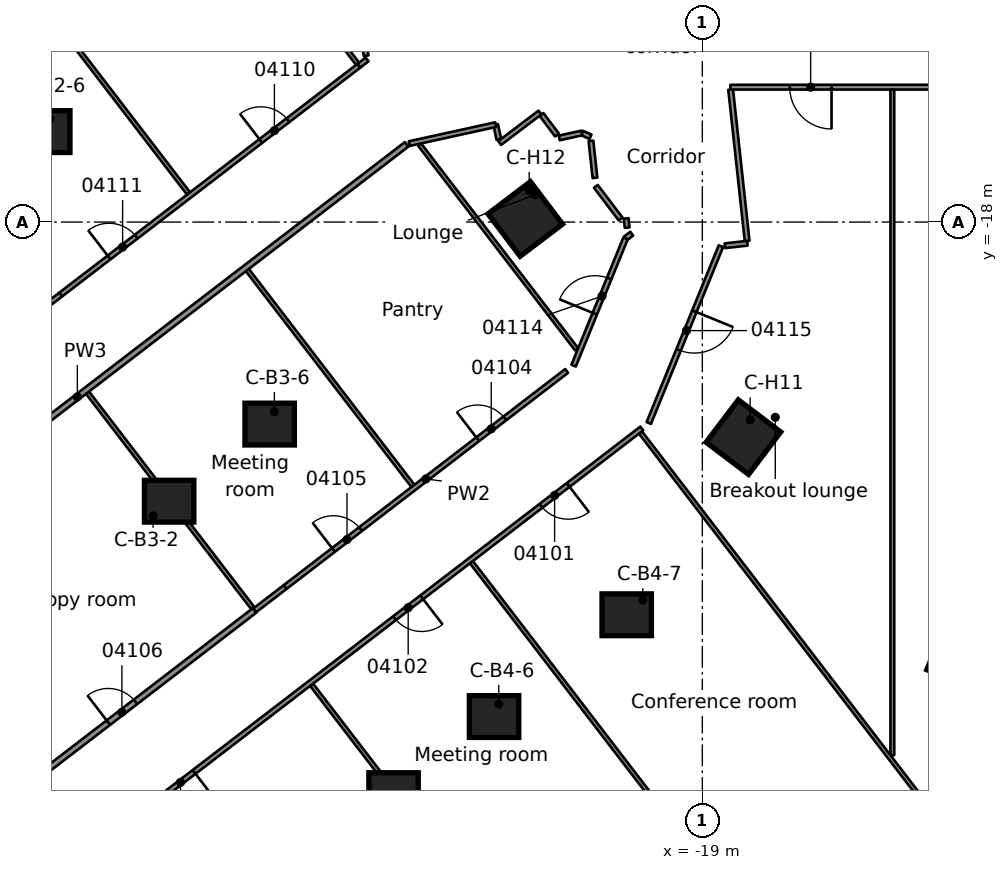
"""IFC4 building model, lengths in metres.
Left out: names, types, materials, properties, quantities, classifications, styles, units other than length and angle.
Written with IfcOpenShell. Run it as: python <this file> out.ifc"""

import sys

from ifc_helpers import new_model, si_unit, direction, frame, frame_2d, origin, origin_2d, place, context, subcontext, project, spatial, rectangle, extrude, element, fill, save


model = new_model("IFC4")
c1 = context("Model", 3, precision=1e-05, world=origin(), true_north=direction((0.0, 1.0)))
c2 = subcontext(c1, "Body", "Model", "MODEL_VIEW")
j1 = project(units=[si_unit("LENGTHUNIT", "METRE"), si_unit("PLANEANGLEUNIT", "RADIAN")], contexts=[c1])
p1 = place(None, origin())
s1 = spatial("IfcSite", under=j1, at=p1, CompositionType="ELEMENT")
p2 = place(p1, origin())
s2 = spatial("IfcBuilding", under=s1, at=p2, CompositionType="ELEMENT")
p3 = place(p2, frame((0.0, 0.0, 20.5)))
s3 = spatial("IfcBuildingStorey", under=s2, at=p3, CompositionType="ELEMENT", Elevation=20.5)
for number, where, z_axis, x_axis in (
    (1, (-36.29, -15.62, 0.0), (0.0, 0.0, 1.0), (1.0, 0.0, 0.0)),
    (2, (-33.03, -25.345, 0.0), (0.0, 0.0, 1.0), (1.0, 0.0, 0.0)),
    (3, (-30.385, -23.316, 0.0), (0.0, 0.0, 1.0), (1.0, 0.0, 0.0)),
    (4, (-27.125, -33.04, 0.0), (0.0, 0.0, 1.0), (1.0, 0.0, 0.0)),
    (5, (-24.48, -31.011, 0.0), (0.0, 0.0, 1.0), (1.0, 0.0, 0.0)),
    (6, (-20.99, -28.333, 0.0), (0.0, 0.0, 1.0), (1.0, 0.0, 0.0)),
):
    element("IfcColumn", number, at=place(p3, frame(where, z_axis=z_axis, x_axis=x_axis)), inside=s3, PredefinedType="COLUMN", context=c2, shape_type="SweptSolid", body=[
        extrude(rectangle(XDim=1.3, YDim=1.1, at=origin_2d()), origin(), (0.0, 0.0, 1.0), 4.6),
    ])
for number, where, z_axis, x_axis in (
    (7, (-12.178, -29.4, 0.0), (0.0, 0.0, 1.0), (-0.383, -0.924, 0.0)),
    (8, (-17.919, -23.659, 0.0), (0.0, 0.0, 1.0), (-0.604, -0.797, 0.0)),
    (9, (-23.659, -17.919, 0.0), (0.0, 0.0, 1.0), (-0.797, -0.604, 0.0)),
):
    element("IfcColumn", number, at=place(p3, frame(where, z_axis=z_axis, x_axis=x_axis)), inside=s3, PredefinedType="COLUMN", context=c2, shape_type="SweptSolid", body=[
        extrude(rectangle(XDim=1.4, YDim=1.4, at=origin_2d()), origin(), (0.0, 0.0, 1.0), 4.6),
    ])
p4 = place(p3, frame((-21.004, -17.904, 0.0), z_axis=(0.0, 0.0, 1.0), x_axis=(0.105933230141, -0.994373245191, 0.0)))
e10 = element("IfcWall", 10, at=p4, inside=s3, PredefinedType="PARTITIONING", context=c2, shape_type="SweptSolid", body=[
    extrude(rectangle(XDim=0.244, YDim=0.125, at=frame_2d((0.122, 0.0))), origin(), (0.0, 0.0, 1.0), 4.16),
])
p5 = place(p3, frame((-21.931, -15.864, 0.0), z_axis=(0.0, 0.0, 1.0), x_axis=(0.10837572028, -0.99411000561, 0.0)))
e11 = element("IfcWall", 11, at=p5, inside=s3, PredefinedType="PARTITIONING", context=c2, shape_type="SweptSolid", body=[
    extrude(rectangle(XDim=0.978, YDim=0.125, at=frame_2d((0.489, 0.0))), origin(), (0.0, 0.0, 1.0), 4.16),
])
p6 = place(p3, frame((-18.255, -14.513, 0.0), z_axis=(0.0, 0.0, 1.0), x_axis=(0.108304050005, -0.994117816334, 0.0)))
e12 = element("IfcWall", 12, at=p6, inside=s3, PredefinedType="PARTITIONING", context=c2, shape_type="SweptSolid", body=[
    extrude(rectangle(XDim=4.006, YDim=0.125, at=frame_2d((2.003, 0.0))), origin(), (0.0, 0.0, 1.0), 4.16),
])
p7 = place(p3, frame((-24.438, -15.437, 0.0), z_axis=(0.0, 0.0, 1.0), x_axis=(0.212096867325, -0.977248647413, 0.0)))
e13 = element("IfcWall", 13, at=p7, inside=s3, PredefinedType="PARTITIONING", context=c2, shape_type="SweptSolid", body=[
    extrude(rectangle(XDim=0.396, YDim=0.125, at=frame_2d((0.198, 0.0))), origin(), (0.0, 0.0, 1.0), 4.16),
])
p8 = place(p3, frame((-27.959, -13.1, 0.0), z_axis=(0.0, 0.0, 1.0), x_axis=(0.215346078447, -0.976537795734, 0.0)))
e14 = element("IfcWall", 14, at=p8, inside=s3, PredefinedType="PARTITIONING", context=c2, shape_type="SweptSolid", body=[
    extrude(rectangle(XDim=0.539, YDim=0.125, at=frame_2d((0.269, 0.0))), origin(), (0.0, 0.0, 1.0), 4.16),
])
p9 = place(p3, frame((-23.234, -15.168, 0.0), z_axis=(0.0, 0.0, 1.0), x_axis=(0.602990949897, -0.797748026849, 0.0)))
e15 = element("IfcWall", 15, at=p9, inside=s3, PredefinedType="PARTITIONING", context=c2, shape_type="SweptSolid", body=[
    extrude(rectangle(XDim=0.678, YDim=0.125, at=frame_2d((0.339, 0.0))), origin(), (0.0, 0.0, 1.0), 4.16),
])
p10 = place(p3, frame((-21.801, -17.061, 0.0), z_axis=(0.0, 0.0, 1.0), x_axis=(0.604123687543, -0.796890563471, 0.0)))
e16 = element("IfcWall", 16, at=p10, inside=s3, PredefinedType="PARTITIONING", context=c2, shape_type="SweptSolid", body=[
    extrude(rectangle(XDim=1.078, YDim=0.125, at=frame_2d((0.539, 0.0))), origin(), (0.0, 0.0, 1.0), 4.16),
])
p11 = place(p3, frame((-35.179, -22.489, 0.0), z_axis=(0.0, 0.0, 1.0), x_axis=(0.608729798771, -0.793377610024, 0.0)))
e17 = element("IfcWall", 17, at=p11, inside=s3, PredefinedType="PARTITIONING", context=c2, shape_type="SweptSolid", body=[
    extrude(rectangle(XDim=7.148, YDim=0.1, at=frame_2d((3.574, 0.0))), origin(), (0.0, 0.0, 1.0), 4.16),
])
p12 = place(p3, frame((-29.282, -30.175, 0.0), z_axis=(0.0, 0.0, 1.0), x_axis=(0.608783902678, -0.793336095132, 0.0)))
e18 = element("IfcWall", 18, at=p12, inside=s3, PredefinedType="PARTITIONING", context=c2, shape_type="SweptSolid", body=[
    extrude(rectangle(XDim=14.136, YDim=0.1, at=frame_2d((7.068, 0.0))), origin(), (0.0, 0.0, 1.0), 4.16),
])
p13 = place(p3, frame((-41.126, -6.033, 0.0), z_axis=(0.0, 0.0, 1.0), x_axis=(0.608775561638, -0.793342495743, 0.0)))
e19 = element("IfcWall", 19, at=p13, inside=s3, PredefinedType="PARTITIONING", context=c2, shape_type="SweptSolid", body=[
    extrude(rectangle(XDim=14.136, YDim=0.1, at=frame_2d((7.068, 0.0))), origin(), (0.0, 0.0, 1.0), 4.16),
])
p14 = place(p3, frame((-30.975, -19.261, 0.0), z_axis=(0.0, 0.0, 1.0), x_axis=(0.60876639971, -0.793349526113, 0.0)))
e20 = element("IfcWall", 20, at=p14, inside=s3, PredefinedType="PARTITIONING", context=c2, shape_type="SweptSolid", body=[
    extrude(rectangle(XDim=7.162, YDim=0.1, at=frame_2d((3.581, 0.0))), origin(), (0.0, 0.0, 1.0), 4.16),
])
p15 = place(p3, frame((-25.077, -26.948, 0.0), z_axis=(0.0, 0.0, 1.0), x_axis=(0.60874219909, -0.793368095557, 0.0)))
e21 = element("IfcWall", 21, at=p15, inside=s3, PredefinedType="PARTITIONING", context=c2, shape_type="SweptSolid", body=[
    extrude(rectangle(XDim=14.137, YDim=0.1, at=frame_2d((7.069, 0.0))), origin(), (0.0, 0.0, 1.0), 4.16),
])
p16 = place(p3, frame((-36.678, -2.62, 0.0), z_axis=(0.0, 0.0, 1.0), x_axis=(0.608783902678, -0.793336095132, 0.0)))
e22 = element("IfcWall", 22, at=p16, inside=s3, PredefinedType="PARTITIONING", context=c2, shape_type="SweptSolid", body=[
    extrude(rectangle(XDim=14.136, YDim=0.1, at=frame_2d((7.068, 0.0))), origin(), (0.0, 0.0, 1.0), 4.16),
])
p17 = place(p3, frame((-26.44, -15.962, 0.0), z_axis=(0.0, 0.0, 1.0), x_axis=(0.608697215762, -0.79340260872, 0.0)))
e23 = element("IfcWall", 23, at=p17, inside=s3, PredefinedType="PARTITIONING", context=c2, shape_type="SweptSolid", body=[
    extrude(rectangle(XDim=6.79, YDim=0.1, at=frame_2d((3.395, 0.0))), origin(), (0.0, 0.0, 1.0), 4.16),
])
p18 = place(p3, frame((-20.63, -23.535, 0.0), z_axis=(0.0, 0.0, 1.0), x_axis=(0.60874219909, -0.793368095557, 0.0)))
e24 = element("IfcWall", 24, at=p18, inside=s3, PredefinedType="PARTITIONING", context=c2, shape_type="SweptSolid", body=[
    extrude(rectangle(XDim=14.137, YDim=0.1, at=frame_2d((7.069, 0.0))), origin(), (0.0, 0.0, 1.0), 4.16),
])
p19 = place(p3, frame((-22.17, -15.656, 0.0), z_axis=(0.0, 0.0, 1.0), x_axis=(0.914864311429, -0.403761429156, 0.0)))
e25 = element("IfcWall", 25, at=p19, inside=s3, PredefinedType="PARTITIONING", context=c2, shape_type="SweptSolid", body=[
    extrude(rectangle(XDim=0.248, YDim=0.125, at=frame_2d((0.124, 0.0))), origin(), (0.0, 0.0, 1.0), 4.16),
])
p20 = place(p3, frame((-10.391, -14.451, 0.0), z_axis=(0.0, 0.0, 1.0), x_axis=(-1.0, 0.0, 0.0)))
e26 = element("IfcWall", 26, at=p20, inside=s3, PredefinedType="PARTITIONING", context=c2, shape_type="SweptSolid", body=[
    extrude(rectangle(XDim=7.871, YDim=0.125, at=frame_2d((3.936, 0.0))), origin(), (0.0, 0.0, 1.0), 4.16),
])
p21 = place(p20, frame((5.209, 0.0, 0.0)))
e27 = element("IfcOpeningElement", 27, at=p21, cuts=e26, PredefinedType="OPENING", context=c2, shape_type="SweptSolid", body=[
    extrude(rectangle(XDim=1.1, YDim=2.1, at=frame_2d((0.55, 1.05))), frame((0.0, 0.073, 0.0), z_axis=(0.0, -1.0, 0.0), x_axis=(1.0, 0.0, 0.0)), (0.0, 0.0, 1.0), 0.145),
])
p22 = place(p20, frame((1.35, 0.0, 0.0)))
e28 = element("IfcOpeningElement", 28, at=p22, cuts=e26, PredefinedType="OPENING", context=c2, shape_type="SweptSolid", body=[
    extrude(rectangle(XDim=0.9, YDim=2.1, at=frame_2d((0.45, 1.05))), frame((0.0, 0.073, 0.0), z_axis=(0.0, -1.0, 0.0), x_axis=(1.0, 0.0, 0.0)), (0.0, 0.0, 1.0), 0.145),
])
p23 = place(p3, frame((-18.406, -18.623, 0.0), z_axis=(0.0, 0.0, 1.0), x_axis=(0.994037722998, 0.109036715182, 0.0)))
e29 = element("IfcWall", 29, at=p23, inside=s3, PredefinedType="PARTITIONING", context=c2, shape_type="SweptSolid", body=[
    extrude(rectangle(XDim=0.596, YDim=0.125, at=frame_2d((0.298, 0.0))), origin(), (0.0, 0.0, 1.0), 4.16),
])
p24 = place(p3, frame((-26.712, -15.936, 0.0), z_axis=(0.0, 0.0, 1.0), x_axis=(0.976756126143, 0.214353609817, 0.0)))
e30 = element("IfcWall", 30, at=p24, inside=s3, PredefinedType="PARTITIONING", context=c2, shape_type="SweptSolid", body=[
    extrude(rectangle(XDim=2.328, YDim=0.125, at=frame_2d((1.164, 0.0))), origin(), (0.0, 0.0, 1.0), 4.16),
])
p25 = place(p3, frame((-22.765, -15.787, 0.0), z_axis=(0.0, 0.0, 1.0), x_axis=(0.97657209397, 0.215190486033, 0.0)))
e31 = element("IfcWall", 31, at=p25, inside=s3, PredefinedType="PARTITIONING", context=c2, shape_type="SweptSolid", body=[
    extrude(rectangle(XDim=0.609, YDim=0.125, at=frame_2d((0.305, 0.0))), origin(), (0.0, 0.0, 1.0), 4.16),
])
p26 = place(p3, frame((-24.332, -15.92, 0.0), z_axis=(0.0, 0.0, 1.0), x_axis=(0.797480426333, 0.603344818172, 0.0)))
e32 = element("IfcWall", 32, at=p26, inside=s3, PredefinedType="PARTITIONING", context=c2, shape_type="SweptSolid", body=[
    extrude(rectangle(XDim=1.329, YDim=0.125, at=frame_2d((0.665, 0.0))), origin(), (0.0, 0.0, 1.0), 4.16),
])
p27 = place(p3, frame((-21.019, -18.428, 0.0), z_axis=(0.0, 0.0, 1.0), x_axis=(0.797092148154, 0.603857687995, 0.0)))
e33 = element("IfcWall", 33, at=p27, inside=s3, PredefinedType="PARTITIONING", context=c2, shape_type="SweptSolid", body=[
    extrude(rectangle(XDim=0.202, YDim=0.125, at=frame_2d((0.101, 0.0))), origin(), (0.0, 0.0, 1.0), 4.16),
])
p28 = place(p3, frame((-20.592, -23.431, 0.0), z_axis=(0.0, 0.0, 1.0), x_axis=(-0.793434310261, -0.608655892356, 0.0)))
e34 = element("IfcWall", 34, at=p28, inside=s3, PredefinedType="PARTITIONING", context=c2, shape_type="SweptSolid", body=[
    extrude(rectangle(XDim=24.899, YDim=0.125, at=frame_2d((12.45, 0.0))), origin(), (0.0, 0.0, 1.0), 4.16),
])
p29 = place(p28, frame((2.443, 0.0, 0.0)))
e35 = element("IfcOpeningElement", 35, at=p29, cuts=e34, PredefinedType="OPENING", context=c2, shape_type="SweptSolid", body=[
    extrude(rectangle(XDim=0.9, YDim=2.1, at=frame_2d((0.45, 1.05))), frame((0.0, 0.073, 0.0), z_axis=(0.0, -1.0, 0.0), x_axis=(1.0, 0.0, 0.0)), (0.0, 0.0, 1.0), 0.145),
])
p30 = place(p28, frame((7.299, 0.0, 0.0)))
e36 = element("IfcOpeningElement", 36, at=p30, cuts=e34, PredefinedType="OPENING", context=c2, shape_type="SweptSolid", body=[
    extrude(rectangle(XDim=0.9, YDim=2.1, at=frame_2d((0.45, 1.05))), frame((0.0, 0.073, 0.0), z_axis=(0.0, -1.0, 0.0), x_axis=(1.0, 0.0, 0.0)), (0.0, 0.0, 1.0), 0.145),
])
p31 = place(p28, frame((14.849, 0.0, 0.0)))
e37 = element("IfcOpeningElement", 37, at=p31, cuts=e34, PredefinedType="OPENING", context=c2, shape_type="SweptSolid", body=[
    extrude(rectangle(XDim=0.9, YDim=2.1, at=frame_2d((0.45, 1.05))), frame((0.0, 0.073, 0.0), z_axis=(0.0, -1.0, 0.0), x_axis=(1.0, 0.0, 0.0)), (0.0, 0.0, 1.0), 0.145),
])
p32 = place(p3, frame((-30.782, -28.22, 0.0), z_axis=(0.0, 0.0, 1.0), x_axis=(0.793579274907, 0.608466872096, 0.0)))
e38 = element("IfcWall", 38, at=p32, inside=s3, PredefinedType="PARTITIONING", context=c2, shape_type="SweptSolid", body=[
    extrude(rectangle(XDim=1.016, YDim=0.125, at=frame_2d((0.508, 0.0))), origin(), (0.0, 0.0, 1.0), 4.16),
])
p33 = place(p3, frame((-39.667, -35.038, 0.0), z_axis=(0.0, 0.0, 1.0), x_axis=(0.793293656215, 0.608839202917, 0.0)))
e39 = element("IfcWall", 39, at=p33, inside=s3, PredefinedType="PARTITIONING", context=c2, shape_type="SweptSolid", body=[
    extrude(rectangle(XDim=11.2, YDim=0.15, at=frame_2d((5.6, 0.0))), origin(), (0.0, 0.0, 1.0), 4.16),
])
p34 = place(p33, frame((6.35, 0.0, 0.0)))
e40 = element("IfcOpeningElement", 40, at=p34, cuts=e39, PredefinedType="OPENING", context=c2, shape_type="SweptSolid", body=[
    extrude(rectangle(XDim=0.9, YDim=2.1, at=frame_2d((0.45, 1.05))), frame((0.0, 0.085, 0.0), z_axis=(0.0, -1.0, 0.0), x_axis=(1.0, 0.0, 0.0)), (0.0, 0.0, 1.0), 0.17),
])
p35 = place(p33, frame((0.85, 0.0, 0.0)))
e41 = element("IfcOpeningElement", 41, at=p35, cuts=e39, PredefinedType="OPENING", context=c2, shape_type="SweptSolid", body=[
    extrude(rectangle(XDim=0.9, YDim=2.1, at=frame_2d((0.45, 1.05))), frame((0.0, 0.085, 0.0), z_axis=(0.0, -1.0, 0.0), x_axis=(1.0, 0.0, 0.0)), (0.0, 0.0, 1.0), 0.17),
])
p36 = place(p3, frame((-29.976, -27.602, 0.0), z_axis=(0.0, 0.0, 1.0), x_axis=(0.793237948633, 0.608911780843, 0.0)))
e42 = element("IfcWall", 42, at=p36, inside=s3, PredefinedType="PARTITIONING", context=c2, shape_type="SweptSolid", body=[
    extrude(rectangle(XDim=9.336, YDim=0.125, at=frame_2d((4.668, 0.0))), origin(), (0.0, 0.0, 1.0), 4.16),
])
p37 = place(p36, frame((6.385, 0.0, 0.0)))
e43 = element("IfcOpeningElement", 43, at=p37, cuts=e42, PredefinedType="OPENING", context=c2, shape_type="SweptSolid", body=[
    extrude(rectangle(XDim=0.9, YDim=2.1, at=frame_2d((0.45, 1.05))), frame((0.0, 0.073, 0.0), z_axis=(0.0, -1.0, 0.0), x_axis=(1.0, 0.0, 0.0)), (0.0, 0.0, 1.0), 0.145),
])
p38 = place(p36, frame((1.6, 0.0, 0.0)))
e44 = element("IfcOpeningElement", 44, at=p38, cuts=e42, PredefinedType="OPENING", context=c2, shape_type="SweptSolid", body=[
    extrude(rectangle(XDim=0.9, YDim=2.1, at=frame_2d((0.45, 1.05))), frame((0.0, 0.073, 0.0), z_axis=(0.0, -1.0, 0.0), x_axis=(1.0, 0.0, 0.0)), (0.0, 0.0, 1.0), 0.145),
])
p39 = place(p3, frame((-44.11, -29.247, 0.0), z_axis=(0.0, 0.0, 1.0), x_axis=(0.793471030698, 0.608608021179, 0.0)))
e45 = element("IfcWall", 45, at=p39, inside=s3, PredefinedType="PARTITIONING", context=c2, shape_type="SweptSolid", body=[
    extrude(rectangle(XDim=21.838, YDim=0.15, at=frame_2d((10.919, 0.0))), origin(), (0.0, 0.0, 1.0), 4.16),
])
p40 = place(p3, frame((-36.687, -20.524, 0.0), z_axis=(0.0, 0.0, 1.0), x_axis=(0.793579274907, 0.608466872096, 0.0)))
e46 = element("IfcWall", 46, at=p40, inside=s3, PredefinedType="PARTITIONING", context=c2, shape_type="SweptSolid", body=[
    extrude(rectangle(XDim=1.016, YDim=0.125, at=frame_2d((0.508, 0.0))), origin(), (0.0, 0.0, 1.0), 4.16),
])
p41 = place(p3, frame((-35.881, -19.906, 0.0), z_axis=(0.0, 0.0, 1.0), x_axis=(0.793370316216, 0.608739304914, 0.0)))
e47 = element("IfcWall", 47, at=p41, inside=s3, PredefinedType="PARTITIONING", context=c2, shape_type="SweptSolid", body=[
    extrude(rectangle(XDim=9.891, YDim=0.125, at=frame_2d((4.945, 0.0))), origin(), (0.0, 0.0, 1.0), 4.16),
])
p42 = place(p41, frame((6.634, 0.0, 0.0)))
e48 = element("IfcOpeningElement", 48, at=p42, cuts=e47, PredefinedType="OPENING", context=c2, shape_type="SweptSolid", body=[
    extrude(rectangle(XDim=0.9, YDim=2.1, at=frame_2d((0.45, 1.05))), frame((0.0, 0.073, 0.0), z_axis=(0.0, -1.0, 0.0), x_axis=(1.0, 0.0, 0.0)), (0.0, 0.0, 1.0), 0.145),
])
p43 = place(p41, frame((1.6, 0.0, 0.0)))
e49 = element("IfcOpeningElement", 49, at=p43, cuts=e47, PredefinedType="OPENING", context=c2, shape_type="SweptSolid", body=[
    extrude(rectangle(XDim=0.9, YDim=2.1, at=frame_2d((0.45, 1.05))), frame((0.0, 0.073, 0.0), z_axis=(0.0, -1.0, 0.0), x_axis=(1.0, 0.0, 0.0)), (0.0, 0.0, 1.0), 0.145),
])
p44 = place(p3, frame((-28.034, -13.885, 0.0), z_axis=(0.0, 0.0, 1.0), x_axis=(0.792488206653, 0.609887237378, 0.0)))
e50 = element("IfcWall", 50, at=p44, inside=s3, PredefinedType="PARTITIONING", context=c2, shape_type="SweptSolid", body=[
    extrude(rectangle(XDim=0.267, YDim=0.125, at=frame_2d((0.134, 0.0))), origin(), (0.0, 0.0, 1.0), 4.16),
])
p45 = place(p3, frame((-18.51, -18.634, 0.0), z_axis=(0.0, 0.0, 1.0), x_axis=(-0.377847706778, -0.925867760797, 0.0)))
e51 = element("IfcWall", 51, at=p45, inside=s3, PredefinedType="PARTITIONING", context=c2, shape_type="SweptSolid", body=[
    extrude(rectangle(XDim=5.026, YDim=0.125, at=frame_2d((2.513, 0.0))), origin(), (0.0, 0.0, 1.0), 4.16),
])
p46 = place(p45, frame((1.85, 0.0, 0.0)))
e52 = element("IfcOpeningElement", 52, at=p46, cuts=e51, PredefinedType="OPENING", context=c2, shape_type="SweptSolid", body=[
    extrude(rectangle(XDim=1.1, YDim=2.1, at=frame_2d((0.55, 1.05))), frame((0.0, 0.073, 0.0), z_axis=(0.0, -1.0, 0.0), x_axis=(1.0, 0.0, 0.0)), (0.0, 0.0, 1.0), 0.145),
])
p47 = place(p3, frame((-22.387, -21.778, 0.0), z_axis=(0.0, 0.0, 1.0), x_axis=(0.377843834017, 0.925869341265, 0.0)))
e53 = element("IfcWall", 53, at=p47, inside=s3, PredefinedType="PARTITIONING", context=c2, shape_type="SweptSolid", body=[
    extrude(rectangle(XDim=3.615, YDim=0.125, at=frame_2d((1.808, 0.0))), origin(), (0.0, 0.0, 1.0), 4.16),
])
p48 = place(p47, frame((1.476, 0.0, 0.0)))
e54 = element("IfcOpeningElement", 54, at=p48, cuts=e53, PredefinedType="OPENING", context=c2, shape_type="SweptSolid", body=[
    extrude(rectangle(XDim=1.0, YDim=2.1, at=frame_2d((0.5, 1.05))), frame((0.0, 0.073, 0.0), z_axis=(0.0, -1.0, 0.0), x_axis=(1.0, 0.0, 0.0)), (0.0, 0.0, 1.0), 0.145),
])
p49 = place(p3, frame((-14.0, -32.028, 0.0), z_axis=(0.0, 0.0, 1.0), x_axis=(0.0, 1.0, 0.0)))
e55 = element("IfcWall", 55, at=p49, inside=s3, PredefinedType="PARTITIONING", context=c2, shape_type="SweptSolid", body=[
    extrude(rectangle(XDim=17.514, YDim=0.1, at=frame_2d((8.757, 0.0))), origin(), (0.0, 0.0, 1.0), 4.16),
])
p50 = place(p29, origin())
e56 = element("IfcDoor", 56, at=p50, inside=s3, OperationType="SINGLE_SWING_LEFT", PredefinedType="DOOR", context=c2, shape_type="SweptSolid", body=[
    extrude(rectangle(XDim=0.9, YDim=2.1, at=frame_2d((0.45, 1.05))), frame((0.0, 0.025, 0.0), z_axis=(0.0, -1.0, 0.0), x_axis=(1.0, 0.0, 0.0)), (0.0, 0.0, 1.0), 0.05),
])
fill(e35, e56)
p51 = place(p30, origin())
e57 = element("IfcDoor", 57, at=p51, inside=s3, OperationType="SINGLE_SWING_LEFT", PredefinedType="DOOR", context=c2, shape_type="SweptSolid", body=[
    extrude(rectangle(XDim=0.9, YDim=2.1, at=frame_2d((0.45, 1.05))), frame((0.0, 0.025, 0.0), z_axis=(0.0, -1.0, 0.0), x_axis=(1.0, 0.0, 0.0)), (0.0, 0.0, 1.0), 0.05),
])
fill(e36, e57)
p52 = place(p31, origin())
e58 = element("IfcDoor", 58, at=p52, inside=s3, OperationType="SINGLE_SWING_RIGHT", PredefinedType="DOOR", context=c2, shape_type="SweptSolid", body=[
    extrude(rectangle(XDim=0.9, YDim=2.1, at=frame_2d((0.45, 1.05))), frame((0.0, 0.025, 0.0), z_axis=(0.0, -1.0, 0.0), x_axis=(1.0, 0.0, 0.0)), (0.0, 0.0, 1.0), 0.05),
])
fill(e37, e58)
p53 = place(p37, origin())
e59 = element("IfcDoor", 59, at=p53, inside=s3, OperationType="SINGLE_SWING_RIGHT", PredefinedType="DOOR", context=c2, shape_type="SweptSolid", body=[
    extrude(rectangle(XDim=0.9, YDim=2.1, at=frame_2d((0.45, 1.05))), frame((0.0, 0.025, 0.0), z_axis=(0.0, -1.0, 0.0), x_axis=(1.0, 0.0, 0.0)), (0.0, 0.0, 1.0), 0.05),
])
fill(e43, e59)
p54 = place(p38, origin())
e60 = element("IfcDoor", 60, at=p54, inside=s3, OperationType="SINGLE_SWING_LEFT", PredefinedType="DOOR", context=c2, shape_type="SweptSolid", body=[
    extrude(rectangle(XDim=0.9, YDim=2.1, at=frame_2d((0.45, 1.05))), frame((0.0, 0.025, 0.0), z_axis=(0.0, -1.0, 0.0), x_axis=(1.0, 0.0, 0.0)), (0.0, 0.0, 1.0), 0.05),
])
fill(e44, e60)
p55 = place(p34, origin())
e61 = element("IfcDoor", 61, at=p55, inside=s3, OperationType="SINGLE_SWING_RIGHT", PredefinedType="DOOR", context=c2, shape_type="SweptSolid", body=[
    extrude(rectangle(XDim=0.9, YDim=2.1, at=frame_2d((0.45, 1.05))), frame((0.0, 0.025, 0.0), z_axis=(0.0, -1.0, 0.0), x_axis=(1.0, 0.0, 0.0)), (0.0, 0.0, 1.0), 0.05),
])
fill(e40, e61)
p56 = place(p42, origin())
e62 = element("IfcDoor", 62, at=p56, inside=s3, OperationType="SINGLE_SWING_RIGHT", PredefinedType="DOOR", context=c2, shape_type="SweptSolid", body=[
    extrude(rectangle(XDim=0.9, YDim=2.1, at=frame_2d((0.45, 1.05))), frame((0.0, 0.025, 0.0), z_axis=(0.0, -1.0, 0.0), x_axis=(1.0, 0.0, 0.0)), (0.0, 0.0, 1.0), 0.05),
])
fill(e48, e62)
p57 = place(p43, origin())
e63 = element("IfcDoor", 63, at=p57, inside=s3, OperationType="SINGLE_SWING_LEFT", PredefinedType="DOOR", context=c2, shape_type="SweptSolid", body=[
    extrude(rectangle(XDim=0.9, YDim=2.1, at=frame_2d((0.45, 1.05))), frame((0.0, 0.025, 0.0), z_axis=(0.0, -1.0, 0.0), x_axis=(1.0, 0.0, 0.0)), (0.0, 0.0, 1.0), 0.05),
])
fill(e49, e63)
p58 = place(p48, origin())
e64 = element("IfcDoor", 64, at=p58, inside=s3, OperationType="SINGLE_SWING_RIGHT", PredefinedType="DOOR", context=c2, shape_type="SweptSolid", body=[
    extrude(rectangle(XDim=1.0, YDim=2.1, at=frame_2d((0.5, 1.05))), frame((0.0, 0.025, 0.0), z_axis=(0.0, -1.0, 0.0), x_axis=(1.0, 0.0, 0.0)), (0.0, 0.0, 1.0), 0.05),
])
fill(e54, e64)
p59 = place(p46, origin())
e65 = element("IfcDoor", 65, at=p59, inside=s3, OperationType="SINGLE_SWING_LEFT", PredefinedType="DOOR", context=c2, shape_type="SweptSolid", body=[
    extrude(rectangle(XDim=1.1, YDim=2.1, at=frame_2d((0.55, 1.05))), frame((0.0, 0.025, 0.0), z_axis=(0.0, -1.0, 0.0), x_axis=(1.0, 0.0, 0.0)), (0.0, 0.0, 1.0), 0.05),
])
fill(e52, e65)
p60 = place(p21, origin())
e66 = element("IfcDoor", 66, at=p60, inside=s3, OperationType="SINGLE_SWING_RIGHT", PredefinedType="DOOR", context=c2, shape_type="SweptSolid", body=[
    extrude(rectangle(XDim=1.1, YDim=2.1, at=frame_2d((0.55, 1.05))), frame((0.0, 0.025, 0.0), z_axis=(0.0, -1.0, 0.0), x_axis=(1.0, 0.0, 0.0)), (0.0, 0.0, 1.0), 0.05),
])
fill(e27, e66)
save(model, sys.argv[1])
